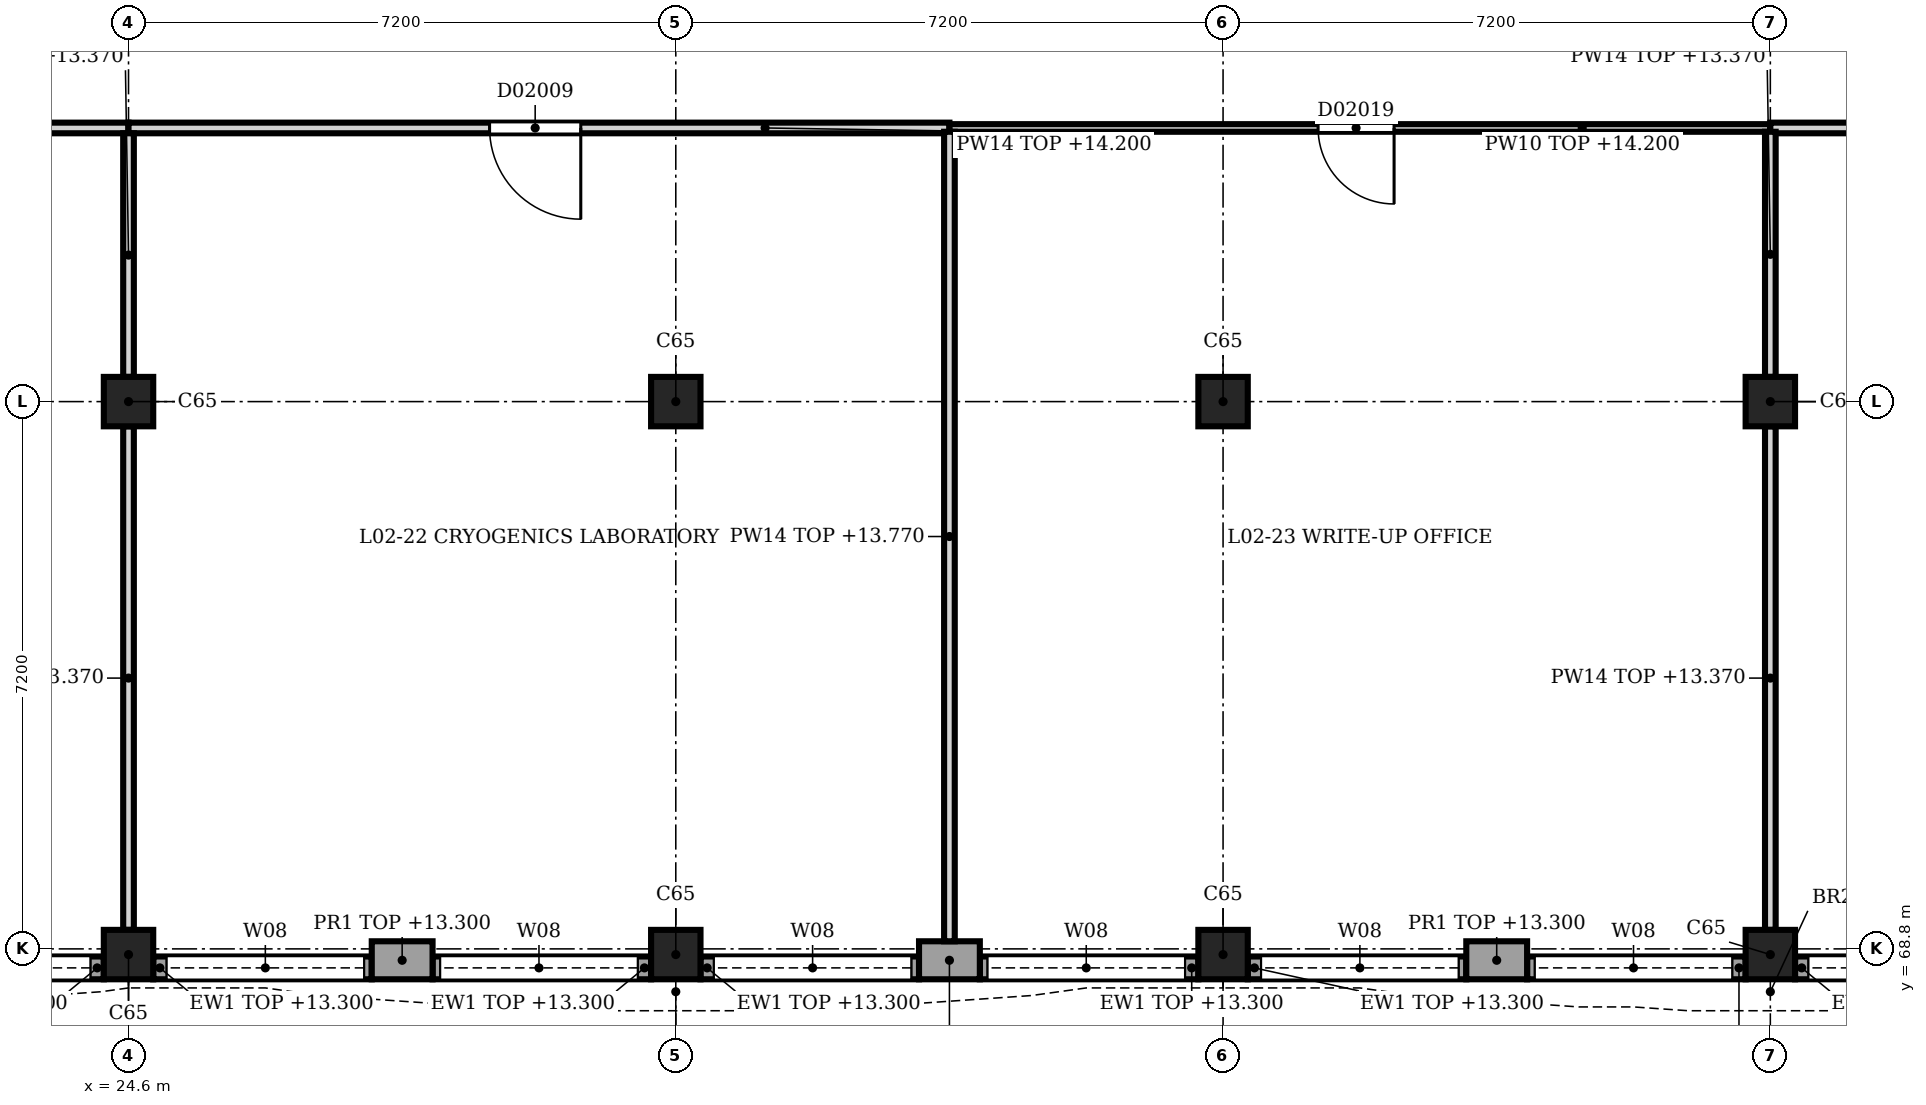
"""IFC4 building model, lengths in metres.
Left out: names, types, materials, properties, quantities, classifications, styles, units other than length and angle.
Written with IfcOpenShell. Run it as: python <this file> out.ifc"""

import sys

from ifc_helpers import new_model, si_unit, direction, frame, frame_2d, origin, origin_2d, place, context, subcontext, project, spatial, rectangle, extrude, element, fill, save


model = new_model("IFC4")
c1 = context("Model", 3, precision=1e-05, world=origin(), true_north=direction((0.0, 1.0)))
c2 = subcontext(c1, "Body", "Model", "MODEL_VIEW")
j1 = project(units=[si_unit("LENGTHUNIT", "METRE"), si_unit("PLANEANGLEUNIT", "RADIAN")], contexts=[c1])
p1 = place(None, origin())
s1 = spatial("IfcSite", under=j1, at=p1, CompositionType="ELEMENT")
p2 = place(p1, origin())
s2 = spatial("IfcBuilding", under=s1, at=p2, CompositionType="ELEMENT")
p3 = place(p2, frame((0.0, 0.0, 9.9)))
s3 = spatial("IfcBuildingStorey", under=s2, at=p3, CompositionType="ELEMENT", Elevation=9.9)
for number, where, z_axis, x_axis in (
    (1, (24.6, 68.725, 0.0), (0.0, 0.0, 1.0), (1.0, 0.0, 0.0)),
    (2, (24.6, 76.0, 0.0), (0.0, 0.0, 1.0), (1.0, 0.0, 0.0)),
    (3, (31.8, 68.725, 0.0), (0.0, 0.0, 1.0), (1.0, 0.0, 0.0)),
    (4, (31.8, 76.0, 0.0), (0.0, 0.0, 1.0), (1.0, 0.0, 0.0)),
    (5, (39.0, 68.725, 0.0), (0.0, 0.0, 1.0), (1.0, 0.0, 0.0)),
    (6, (39.0, 76.0, 0.0), (0.0, 0.0, 1.0), (1.0, 0.0, 0.0)),
    (7, (46.2, 68.725, 0.0), (0.0, 0.0, 1.0), (1.0, 0.0, 0.0)),
    (8, (46.2, 76.0, 0.0), (0.0, 0.0, 1.0), (1.0, 0.0, 0.0)),
):
    element("IfcColumn", number, at=place(p3, frame(where, z_axis=z_axis, x_axis=x_axis)), inside=s3, PredefinedType="COLUMN", context=c2, shape_type="SweptSolid", body=[
        extrude(rectangle(XDim=0.65, YDim=0.65, at=origin_2d()), origin(), (0.0, 0.0, 1.0), 4.5),
    ])
for number, where, z_axis, x_axis in (
    (9, (43.0, 68.65, 0.0), (0.0, 0.0, 1.0), (-1.0, 0.0, 0.0)),
    (10, (35.8, 68.65, 0.0), (0.0, 0.0, 1.0), (-1.0, 0.0, 0.0)),
    (11, (28.6, 68.65, 0.0), (0.0, 0.0, 1.0), (-1.0, 0.0, 0.0)),
):
    element("IfcWall", number, at=place(p3, frame(where, z_axis=z_axis, x_axis=x_axis)), inside=s3, PredefinedType="SOLIDWALL", context=c2, shape_type="SweptSolid", body=[
        extrude(rectangle(XDim=0.8, YDim=0.5, at=frame_2d((0.4, 0.0))), origin(), (0.0, 0.0, 1.0), 3.4),
    ])
p4 = place(p3, frame((49.4, 68.55, 0.0), z_axis=(0.0, 0.0, 1.0), x_axis=(-1.0, 0.0, 0.0)))
e12 = element("IfcWall", 12, at=p4, inside=s3, PredefinedType="SOLIDWALL", context=c2, shape_type="SweptSolid", body=[
    extrude(rectangle(XDim=2.875, YDim=0.3, at=frame_2d((1.438, 0.0))), origin(), (0.0, 0.0, 1.0), 3.4),
])
p5 = place(p4, frame((0.1, 0.0, 1.2)))
e13 = element("IfcOpeningElement", 13, at=p5, cuts=e12, PredefinedType="OPENING", context=c2, shape_type="SweptSolid", body=[
    extrude(rectangle(XDim=2.6, YDim=2.1, at=frame_2d((1.3, 1.05))), frame((0.0, 0.16, 0.0), z_axis=(0.0, -1.0, 0.0), x_axis=(1.0, 0.0, 0.0)), (0.0, 0.0, 1.0), 0.32),
])
p6 = place(p3, frame((45.875, 68.55, 0.0), z_axis=(0.0, 0.0, 1.0), x_axis=(-1.0, 0.0, 0.0)))
e14 = element("IfcWall", 14, at=p6, inside=s3, PredefinedType="SOLIDWALL", context=c2, shape_type="SweptSolid", body=[
    extrude(rectangle(XDim=2.875, YDim=0.3, at=frame_2d((1.438, 0.0))), origin(), (0.0, 0.0, 1.0), 3.4),
])
p7 = place(p6, frame((0.175, 0.0, 1.2)))
e15 = element("IfcOpeningElement", 15, at=p7, cuts=e14, PredefinedType="OPENING", context=c2, shape_type="SweptSolid", body=[
    extrude(rectangle(XDim=2.6, YDim=2.1, at=frame_2d((1.3, 1.05))), frame((0.0, 0.16, 0.0), z_axis=(0.0, -1.0, 0.0), x_axis=(1.0, 0.0, 0.0)), (0.0, 0.0, 1.0), 0.32),
])
p8 = place(p3, frame((42.2, 68.55, 0.0), z_axis=(0.0, 0.0, 1.0), x_axis=(-1.0, 0.0, 0.0)))
e16 = element("IfcWall", 16, at=p8, inside=s3, PredefinedType="SOLIDWALL", context=c2, shape_type="SweptSolid", body=[
    extrude(rectangle(XDim=2.875, YDim=0.3, at=frame_2d((1.438, 0.0))), origin(), (0.0, 0.0, 1.0), 3.4),
])
p9 = place(p8, frame((0.1, 0.0, 1.2)))
e17 = element("IfcOpeningElement", 17, at=p9, cuts=e16, PredefinedType="OPENING", context=c2, shape_type="SweptSolid", body=[
    extrude(rectangle(XDim=2.6, YDim=2.1, at=frame_2d((1.3, 1.05))), frame((0.0, 0.16, 0.0), z_axis=(0.0, -1.0, 0.0), x_axis=(1.0, 0.0, 0.0)), (0.0, 0.0, 1.0), 0.32),
])
p10 = place(p3, frame((38.675, 68.55, 0.0), z_axis=(0.0, 0.0, 1.0), x_axis=(-1.0, 0.0, 0.0)))
e18 = element("IfcWall", 18, at=p10, inside=s3, PredefinedType="SOLIDWALL", context=c2, shape_type="SweptSolid", body=[
    extrude(rectangle(XDim=2.875, YDim=0.3, at=frame_2d((1.438, 0.0))), origin(), (0.0, 0.0, 1.0), 3.4),
])
p11 = place(p10, frame((0.175, 0.0, 1.2)))
e19 = element("IfcOpeningElement", 19, at=p11, cuts=e18, PredefinedType="OPENING", context=c2, shape_type="SweptSolid", body=[
    extrude(rectangle(XDim=2.6, YDim=2.1, at=frame_2d((1.3, 1.05))), frame((0.0, 0.16, 0.0), z_axis=(0.0, -1.0, 0.0), x_axis=(1.0, 0.0, 0.0)), (0.0, 0.0, 1.0), 0.32),
])
p12 = place(p3, frame((35.0, 68.55, 0.0), z_axis=(0.0, 0.0, 1.0), x_axis=(-1.0, 0.0, 0.0)))
e20 = element("IfcWall", 20, at=p12, inside=s3, PredefinedType="SOLIDWALL", context=c2, shape_type="SweptSolid", body=[
    extrude(rectangle(XDim=2.875, YDim=0.3, at=frame_2d((1.438, 0.0))), origin(), (0.0, 0.0, 1.0), 3.4),
])
p13 = place(p12, frame((0.1, 0.0, 1.2)))
e21 = element("IfcOpeningElement", 21, at=p13, cuts=e20, PredefinedType="OPENING", context=c2, shape_type="SweptSolid", body=[
    extrude(rectangle(XDim=2.6, YDim=2.1, at=frame_2d((1.3, 1.05))), frame((0.0, 0.16, 0.0), z_axis=(0.0, -1.0, 0.0), x_axis=(1.0, 0.0, 0.0)), (0.0, 0.0, 1.0), 0.32),
])
p14 = place(p3, frame((31.475, 68.55, 0.0), z_axis=(0.0, 0.0, 1.0), x_axis=(-1.0, 0.0, 0.0)))
e22 = element("IfcWall", 22, at=p14, inside=s3, PredefinedType="SOLIDWALL", context=c2, shape_type="SweptSolid", body=[
    extrude(rectangle(XDim=2.875, YDim=0.3, at=frame_2d((1.438, 0.0))), origin(), (0.0, 0.0, 1.0), 3.4),
])
p15 = place(p14, frame((0.175, 0.0, 1.2)))
e23 = element("IfcOpeningElement", 23, at=p15, cuts=e22, PredefinedType="OPENING", context=c2, shape_type="SweptSolid", body=[
    extrude(rectangle(XDim=2.6, YDim=2.1, at=frame_2d((1.3, 1.05))), frame((0.0, 0.16, 0.0), z_axis=(0.0, -1.0, 0.0), x_axis=(1.0, 0.0, 0.0)), (0.0, 0.0, 1.0), 0.32),
])
p16 = place(p3, frame((27.8, 68.55, 0.0), z_axis=(0.0, 0.0, 1.0), x_axis=(-1.0, 0.0, 0.0)))
e24 = element("IfcWall", 24, at=p16, inside=s3, PredefinedType="SOLIDWALL", context=c2, shape_type="SweptSolid", body=[
    extrude(rectangle(XDim=2.875, YDim=0.3, at=frame_2d((1.438, 0.0))), origin(), (0.0, 0.0, 1.0), 3.4),
])
p17 = place(p16, frame((0.1, 0.0, 1.2)))
e25 = element("IfcOpeningElement", 25, at=p17, cuts=e24, PredefinedType="OPENING", context=c2, shape_type="SweptSolid", body=[
    extrude(rectangle(XDim=2.6, YDim=2.1, at=frame_2d((1.3, 1.05))), frame((0.0, 0.16, 0.0), z_axis=(0.0, -1.0, 0.0), x_axis=(1.0, 0.0, 0.0)), (0.0, 0.0, 1.0), 0.32),
])
p18 = place(p3, frame((24.275, 68.55, 0.0), z_axis=(0.0, 0.0, 1.0), x_axis=(-1.0, 0.0, 0.0)))
e26 = element("IfcWall", 26, at=p18, inside=s3, PredefinedType="SOLIDWALL", context=c2, shape_type="SweptSolid", body=[
    extrude(rectangle(XDim=2.875, YDim=0.3, at=frame_2d((1.438, 0.0))), origin(), (0.0, 0.0, 1.0), 3.4),
])
p19 = place(p18, frame((0.175, 0.0, 1.2)))
e27 = element("IfcOpeningElement", 27, at=p19, cuts=e26, PredefinedType="OPENING", context=c2, shape_type="SweptSolid", body=[
    extrude(rectangle(XDim=2.6, YDim=2.1, at=frame_2d((1.3, 1.05))), frame((0.0, 0.16, 0.0), z_axis=(0.0, -1.0, 0.0), x_axis=(1.0, 0.0, 0.0)), (0.0, 0.0, 1.0), 0.32),
])
p20 = place(p3, frame((24.6, 79.6, 0.0), z_axis=(0.0, 0.0, 1.0), x_axis=(-1.0, 0.0, 0.0)))
e28 = element("IfcWall", 28, at=p20, inside=s3, PredefinedType="PARTITIONING", context=c2, shape_type="SweptSolid", body=[
    extrude(rectangle(XDim=21.5, YDim=0.14, at=frame_2d((10.75, 0.0))), origin(), (0.0, 0.0, 1.0), 4.3),
])
p21 = place(p20, frame((10.25, 0.0, 0.0)))
e29 = element("IfcOpeningElement", 29, at=p21, cuts=e28, PredefinedType="OPENING", context=c2, shape_type="SweptSolid", body=[
    extrude(rectangle(XDim=1.2, YDim=2.1, at=frame_2d((0.6, 1.05))), frame((0.0, 0.08, 0.0), z_axis=(0.0, -1.0, 0.0), x_axis=(1.0, 0.0, 0.0)), (0.0, 0.0, 1.0), 0.16),
])
p22 = place(p3, frame((35.4, 79.6, 0.0), z_axis=(0.0, 0.0, 1.0), x_axis=(-1.0, 0.0, 0.0)))
e30 = element("IfcWall", 30, at=p22, inside=s3, PredefinedType="PARTITIONING", context=c2, shape_type="SweptSolid", body=[
    extrude(rectangle(XDim=10.8, YDim=0.14, at=frame_2d((5.4, 0.0))), origin(), (0.0, 0.0, 1.0), 4.3),
])
p23 = place(p22, frame((4.85, 0.0, 0.0)))
e31 = element("IfcOpeningElement", 31, at=p23, cuts=e30, PredefinedType="OPENING", context=c2, shape_type="SweptSolid", body=[
    extrude(rectangle(XDim=1.2, YDim=2.1, at=frame_2d((0.6, 1.05))), frame((0.0, 0.08, 0.0), z_axis=(0.0, -1.0, 0.0), x_axis=(1.0, 0.0, 0.0)), (0.0, 0.0, 1.0), 0.16),
])
p24 = place(p3, frame((46.2, 79.6, 0.0), z_axis=(0.0, 0.0, 1.0), x_axis=(-1.0, 0.0, 0.0)))
e32 = element("IfcWall", 32, at=p24, inside=s3, PredefinedType="PARTITIONING", context=c2, shape_type="SweptSolid", body=[
    extrude(rectangle(XDim=10.8, YDim=0.1, at=frame_2d((5.4, 0.0))), origin(), (0.0, 0.0, 1.0), 4.3),
])
p25 = place(p24, frame((4.95, 0.0, 0.0)))
e33 = element("IfcOpeningElement", 33, at=p25, cuts=e32, PredefinedType="OPENING", context=c2, shape_type="SweptSolid", body=[
    extrude(rectangle(XDim=1.0, YDim=2.1, at=frame_2d((0.5, 1.05))), frame((0.0, 0.06, 0.0), z_axis=(0.0, -1.0, 0.0), x_axis=(1.0, 0.0, 0.0)), (0.0, 0.0, 1.0), 0.12),
])
p26 = place(p3, frame((67.8, 79.6, 0.0), z_axis=(0.0, 0.0, 1.0), x_axis=(-1.0, 0.0, 0.0)))
e34 = element("IfcWall", 34, at=p26, inside=s3, PredefinedType="PARTITIONING", context=c2, shape_type="SweptSolid", body=[
    extrude(rectangle(XDim=21.6, YDim=0.14, at=frame_2d((10.8, 0.0))), origin(), (0.0, 0.0, 1.0), 4.3),
])
p27 = place(p26, frame((10.25, 0.0, 0.0)))
e35 = element("IfcOpeningElement", 35, at=p27, cuts=e34, PredefinedType="OPENING", context=c2, shape_type="SweptSolid", body=[
    extrude(rectangle(XDim=1.2, YDim=2.1, at=frame_2d((0.6, 1.05))), frame((0.0, 0.08, 0.0), z_axis=(0.0, -1.0, 0.0), x_axis=(1.0, 0.0, 0.0)), (0.0, 0.0, 1.0), 0.16),
])
p28 = place(p3, frame((24.6, 69.05, 0.0), z_axis=(0.0, 0.0, 1.0), x_axis=(0.0, 1.0, 0.0)))
e36 = element("IfcWall", 36, at=p28, inside=s3, PredefinedType="PARTITIONING", context=c2, shape_type="SweptSolid", body=[
    extrude(rectangle(XDim=6.625, YDim=0.14, at=frame_2d((3.312, 0.0))), origin(), (0.0, 0.0, 1.0), 3.47),
])
p29 = place(p3, frame((24.6, 76.325, 0.0), z_axis=(0.0, 0.0, 1.0), x_axis=(0.0, 1.0, 0.0)))
e37 = element("IfcWall", 37, at=p29, inside=s3, PredefinedType="PARTITIONING", context=c2, shape_type="SweptSolid", body=[
    extrude(rectangle(XDim=3.205, YDim=0.14, at=frame_2d((1.603, 0.0))), origin(), (0.0, 0.0, 1.0), 3.47),
])
p30 = place(p3, frame((35.4, 68.9, 0.0), z_axis=(0.0, 0.0, 1.0), x_axis=(0.0, 1.0, 0.0)))
e38 = element("IfcWall", 38, at=p30, inside=s3, PredefinedType="PARTITIONING", context=c2, shape_type="SweptSolid", body=[
    extrude(rectangle(XDim=10.65, YDim=0.14, at=frame_2d((5.325, 0.0))), origin(), (0.0, 0.0, 1.0), 3.87),
])
p31 = place(p3, frame((46.2, 69.05, 0.0), z_axis=(0.0, 0.0, 1.0), x_axis=(0.0, 1.0, 0.0)))
e39 = element("IfcWall", 39, at=p31, inside=s3, PredefinedType="PARTITIONING", context=c2, shape_type="SweptSolid", body=[
    extrude(rectangle(XDim=6.625, YDim=0.14, at=frame_2d((3.312, 0.0))), origin(), (0.0, 0.0, 1.0), 3.47),
])
p32 = place(p3, frame((46.2, 76.325, 0.0), z_axis=(0.0, 0.0, 1.0), x_axis=(0.0, 1.0, 0.0)))
e40 = element("IfcWall", 40, at=p32, inside=s3, PredefinedType="PARTITIONING", context=c2, shape_type="SweptSolid", body=[
    extrude(rectangle(XDim=3.225, YDim=0.14, at=frame_2d((1.613, 0.0))), origin(), (0.0, 0.0, 1.0), 3.47),
])
p33 = place(p5, origin())
e41 = element("IfcWindow", 41, at=p33, inside=s3, PartitioningType="SINGLE_PANEL", PredefinedType="WINDOW", context=c2, shape_type="SweptSolid", body=[
    extrude(rectangle(XDim=2.6, YDim=2.1, at=frame_2d((1.3, 1.05))), frame((0.0, 0.03, 0.0), z_axis=(0.0, -1.0, 0.0), x_axis=(1.0, 0.0, 0.0)), (0.0, 0.0, 1.0), 0.06),
])
fill(e13, e41)
p34 = place(p7, origin())
e42 = element("IfcWindow", 42, at=p34, inside=s3, PartitioningType="SINGLE_PANEL", PredefinedType="WINDOW", context=c2, shape_type="SweptSolid", body=[
    extrude(rectangle(XDim=2.6, YDim=2.1, at=frame_2d((1.3, 1.05))), frame((0.0, 0.03, 0.0), z_axis=(0.0, -1.0, 0.0), x_axis=(1.0, 0.0, 0.0)), (0.0, 0.0, 1.0), 0.06),
])
fill(e15, e42)
p35 = place(p9, origin())
e43 = element("IfcWindow", 43, at=p35, inside=s3, PartitioningType="SINGLE_PANEL", PredefinedType="WINDOW", context=c2, shape_type="SweptSolid", body=[
    extrude(rectangle(XDim=2.6, YDim=2.1, at=frame_2d((1.3, 1.05))), frame((0.0, 0.03, 0.0), z_axis=(0.0, -1.0, 0.0), x_axis=(1.0, 0.0, 0.0)), (0.0, 0.0, 1.0), 0.06),
])
fill(e17, e43)
p36 = place(p11, origin())
e44 = element("IfcWindow", 44, at=p36, inside=s3, PartitioningType="SINGLE_PANEL", PredefinedType="WINDOW", context=c2, shape_type="SweptSolid", body=[
    extrude(rectangle(XDim=2.6, YDim=2.1, at=frame_2d((1.3, 1.05))), frame((0.0, 0.03, 0.0), z_axis=(0.0, -1.0, 0.0), x_axis=(1.0, 0.0, 0.0)), (0.0, 0.0, 1.0), 0.06),
])
fill(e19, e44)
p37 = place(p13, origin())
e45 = element("IfcWindow", 45, at=p37, inside=s3, PartitioningType="SINGLE_PANEL", PredefinedType="WINDOW", context=c2, shape_type="SweptSolid", body=[
    extrude(rectangle(XDim=2.6, YDim=2.1, at=frame_2d((1.3, 1.05))), frame((0.0, 0.03, 0.0), z_axis=(0.0, -1.0, 0.0), x_axis=(1.0, 0.0, 0.0)), (0.0, 0.0, 1.0), 0.06),
])
fill(e21, e45)
p38 = place(p15, origin())
e46 = element("IfcWindow", 46, at=p38, inside=s3, PartitioningType="SINGLE_PANEL", PredefinedType="WINDOW", context=c2, shape_type="SweptSolid", body=[
    extrude(rectangle(XDim=2.6, YDim=2.1, at=frame_2d((1.3, 1.05))), frame((0.0, 0.03, 0.0), z_axis=(0.0, -1.0, 0.0), x_axis=(1.0, 0.0, 0.0)), (0.0, 0.0, 1.0), 0.06),
])
fill(e23, e46)
p39 = place(p17, origin())
e47 = element("IfcWindow", 47, at=p39, inside=s3, PartitioningType="SINGLE_PANEL", PredefinedType="WINDOW", context=c2, shape_type="SweptSolid", body=[
    extrude(rectangle(XDim=2.6, YDim=2.1, at=frame_2d((1.3, 1.05))), frame((0.0, 0.03, 0.0), z_axis=(0.0, -1.0, 0.0), x_axis=(1.0, 0.0, 0.0)), (0.0, 0.0, 1.0), 0.06),
])
fill(e25, e47)
p40 = place(p19, origin())
e48 = element("IfcWindow", 48, at=p40, inside=s3, PartitioningType="SINGLE_PANEL", PredefinedType="WINDOW", context=c2, shape_type="SweptSolid", body=[
    extrude(rectangle(XDim=2.6, YDim=2.1, at=frame_2d((1.3, 1.05))), frame((0.0, 0.03, 0.0), z_axis=(0.0, -1.0, 0.0), x_axis=(1.0, 0.0, 0.0)), (0.0, 0.0, 1.0), 0.06),
])
fill(e27, e48)
p41 = place(p23, origin())
e49 = element("IfcDoor", 49, at=p41, inside=s3, OperationType="SINGLE_SWING_RIGHT", PredefinedType="DOOR", context=c2, shape_type="SweptSolid", body=[
    extrude(rectangle(XDim=1.2, YDim=2.1, at=frame_2d((0.6, 1.05))), frame((0.0, 0.025, 0.0), z_axis=(0.0, -1.0, 0.0), x_axis=(1.0, 0.0, 0.0)), (0.0, 0.0, 1.0), 0.05),
])
fill(e31, e49)
p42 = place(p25, origin())
e50 = element("IfcDoor", 50, at=p42, inside=s3, OperationType="SINGLE_SWING_RIGHT", PredefinedType="DOOR", context=c2, shape_type="SweptSolid", body=[
    extrude(rectangle(XDim=1.0, YDim=2.1, at=frame_2d((0.5, 1.05))), frame((0.0, 0.025, 0.0), z_axis=(0.0, -1.0, 0.0), x_axis=(1.0, 0.0, 0.0)), (0.0, 0.0, 1.0), 0.05),
])
fill(e33, e50)
save(model, sys.argv[1])
